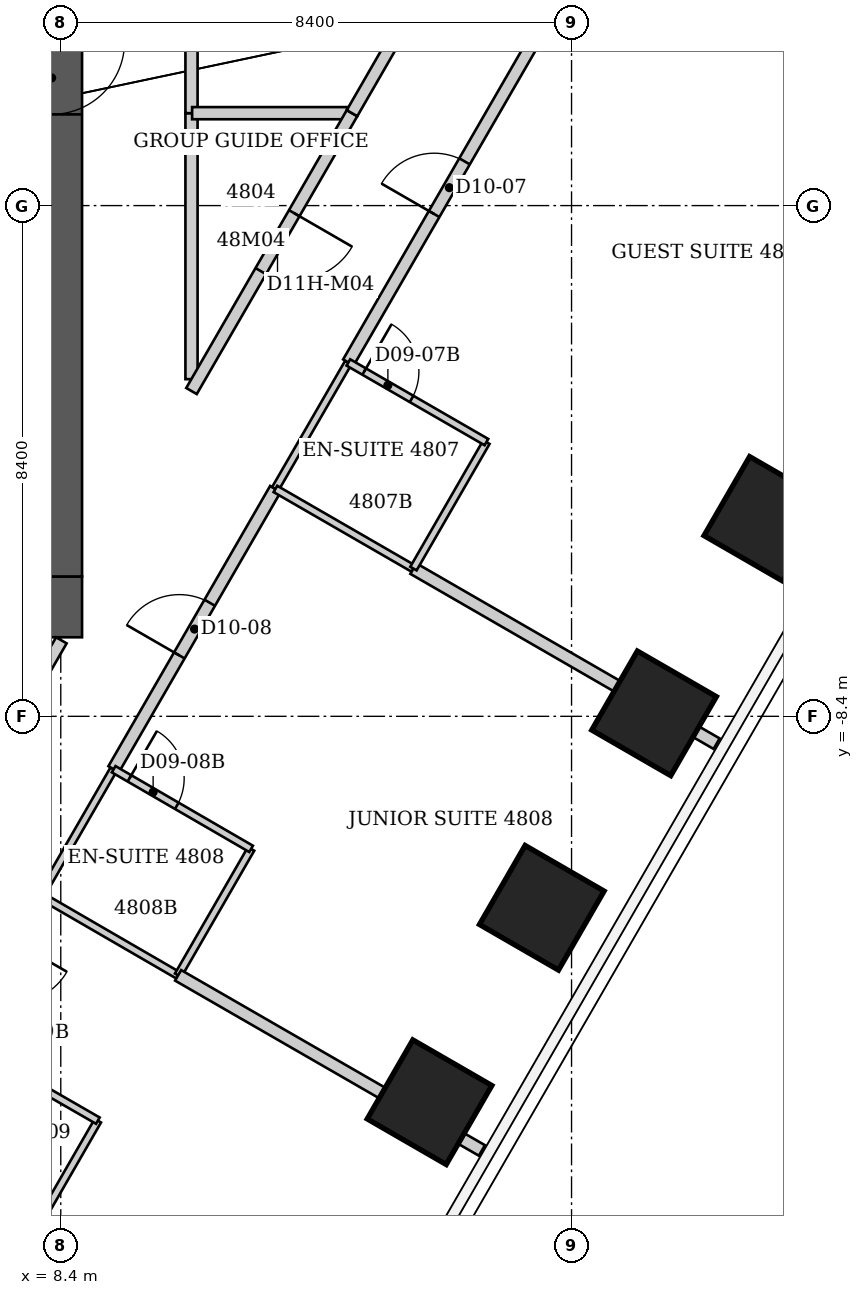
"""IFC4 building model, lengths in metres.
Left out: names, types, materials, properties, quantities, classifications, styles, units other than length and angle.
Written with IfcOpenShell. Run it as: python <this file> out.ifc"""

import sys

from ifc_helpers import new_model, si_unit, direction, frame, frame_2d, origin, origin_2d, place, context, subcontext, project, spatial, rectangle, extrude, element, fill, save


model = new_model("IFC4")
c1 = context("Model", 3, precision=1e-05, world=origin(), true_north=direction((0.0, 1.0)))
c2 = subcontext(c1, "Body", "Model", "MODEL_VIEW")
j1 = project(units=[si_unit("LENGTHUNIT", "METRE"), si_unit("PLANEANGLEUNIT", "RADIAN")], contexts=[c1])
p1 = place(None, origin())
s1 = spatial("IfcSite", under=j1, at=p1, CompositionType="ELEMENT")
p2 = place(p1, origin())
s2 = spatial("IfcBuilding", under=s1, at=p2, CompositionType="ELEMENT")
p3 = place(p2, frame((0.0, 0.0, 194.6)))
s3 = spatial("IfcBuildingStorey", under=s2, at=p3, CompositionType="ELEMENT", Elevation=194.6)
for number, where, z_axis, x_axis in (
    (1, (20.003, -5.153, 0.0), (0.0, 0.0, 1.0), (0.866, -0.5, 0.0)),
    (2, (18.157, -8.351, 0.0), (0.0, 0.0, 1.0), (0.866, -0.5, 0.0)),
    (3, (16.311, -11.549, 0.0), (0.0, 0.0, 1.0), (0.866, -0.5, 0.0)),
    (4, (14.465, -14.747, 0.0), (0.0, 0.0, 1.0), (0.866, -0.5, 0.0)),
):
    element("IfcColumn", number, at=place(p3, frame(where, z_axis=z_axis, x_axis=x_axis)), inside=s3, PredefinedType="COLUMN", context=c2, shape_type="SweptSolid", body=[
        extrude(rectangle(XDim=1.5, YDim=1.5, at=origin_2d()), origin(), (0.0, 0.0, 1.0), 3.8),
    ])
p4 = place(p3, frame((-8.75, -6.6, 0.0), z_axis=(0.0, 0.0, 1.0), x_axis=(1.0, 0.0, 0.0)))
e5 = element("IfcWall", 5, at=p4, inside=s3, PredefinedType="SHEAR", context=c2, shape_type="SweptSolid", body=[
    extrude(rectangle(XDim=17.5, YDim=1.0, at=frame_2d((8.75, 0.0))), origin(), (0.0, 0.0, 1.0), 3.8),
])
p5 = place(p3, frame((8.25, -6.1, 0.0), z_axis=(0.0, 0.0, 1.0), x_axis=(0.0, 1.0, 0.0)))
e6 = element("IfcWall", 6, at=p5, inside=s3, PredefinedType="SHEAR", context=c2, shape_type="SweptSolid", body=[
    extrude(rectangle(XDim=12.2, YDim=1.0, at=frame_2d((6.1, 0.0))), origin(), (0.0, 0.0, 1.0), 3.8),
])
p6 = place(p5, frame((7.6, 0.0, 0.0)))
e7 = element("IfcOpeningElement", 7, at=p6, cuts=e6, PredefinedType="OPENING", context=c2, shape_type="SweptSolid", body=[
    extrude(rectangle(XDim=1.2, YDim=2.2, at=frame_2d((0.6, 1.1))), frame((0.0, 0.5, 0.0), z_axis=(0.0, -1.0, 0.0), x_axis=(1.0, 0.0, 0.0)), (0.0, 0.0, 1.0), 1.0),
])
p7 = place(p3, frame((5.515, -15.932, 0.0), z_axis=(0.0, 0.0, 1.0), x_axis=(0.327594697431, -0.944818349851, 0.0)))
e8 = element("IfcWall", 8, at=p7, inside=s3, PredefinedType="PARTITIONING", context=c2, shape_type="SweptSolid", body=[
    extrude(rectangle(XDim=10.668, YDim=0.2, at=frame_2d((5.334, 0.0))), origin(), (0.0, 0.0, 1.0), 3.64),
])
p8 = place(p3, frame((7.76, -17.22, 0.0), z_axis=(0.0, 0.0, 1.0), x_axis=(0.499159685399, 0.866510016372, 0.0)))
e9 = element("IfcWall", 9, at=p8, inside=s3, PredefinedType="PARTITIONING", context=c2, shape_type="SweptSolid", body=[
    extrude(rectangle(XDim=2.504, YDim=0.12, at=frame_2d((1.252, 0.0))), origin(), (0.0, 0.0, 1.0), 3.64),
])
p9 = place(p3, frame((8.07, -11.35, 0.0), z_axis=(0.0, 0.0, 1.0), x_axis=(0.499693115345, 0.866202511239, 0.0)))
e10 = element("IfcWall", 10, at=p9, inside=s3, PredefinedType="PARTITIONING", context=c2, shape_type="SweptSolid", body=[
    extrude(rectangle(XDim=2.401, YDim=0.12, at=frame_2d((1.201, 0.0))), origin(), (0.0, 0.0, 1.0), 3.64),
])
p10 = place(p3, frame((8.07, -11.35, 0.0), z_axis=(0.0, 0.0, 1.0), x_axis=(0.865195830568, -0.501434118073, 0.0)))
e11 = element("IfcWall", 11, at=p10, inside=s3, PredefinedType="PARTITIONING", context=c2, shape_type="SweptSolid", body=[
    extrude(rectangle(XDim=2.612, YDim=0.12, at=frame_2d((1.306, 0.0))), origin(), (0.0, 0.0, 1.0), 3.64),
])
p11 = place(p3, frame((8.41, -7.15, 0.0), z_axis=(0.0, 0.0, 1.0), x_axis=(-0.499828628176, -0.866124322748, 0.0)))
e12 = element("IfcWall", 12, at=p11, inside=s3, PredefinedType="PARTITIONING", context=c2, shape_type="SweptSolid", body=[
    extrude(rectangle(XDim=10.484, YDim=0.2, at=frame_2d((5.242, 0.0))), origin(), (0.0, 0.0, 1.0), 3.64),
])
p12 = place(p11, frame((4.692, 0.0, 0.0)))
e13 = element("IfcOpeningElement", 13, at=p12, cuts=e12, PredefinedType="OPENING", context=c2, shape_type="SweptSolid", body=[
    extrude(rectangle(XDim=1.1, YDim=2.2, at=frame_2d((0.55, 1.1))), frame((0.0, 0.1, 0.0), z_axis=(0.0, -1.0, 0.0), x_axis=(1.0, 0.0, 0.0)), (0.0, 0.0, 1.0), 0.2),
])
p13 = place(p3, frame((9.01, -15.05, 0.0), z_axis=(0.0, 0.0, 1.0), x_axis=(-0.866615255992, 0.498976951453, 0.0)))
e14 = element("IfcWall", 14, at=p13, inside=s3, PredefinedType="PARTITIONING", context=c2, shape_type="SweptSolid", body=[
    extrude(rectangle(XDim=2.666, YDim=0.12, at=frame_2d((1.333, 0.0))), origin(), (0.0, 0.0, 1.0), 3.64),
])
p14 = place(p13, frame((1.466, 0.0, 0.0)))
e15 = element("IfcOpeningElement", 15, at=p14, cuts=e14, PredefinedType="OPENING", context=c2, shape_type="SweptSolid", body=[
    extrude(rectangle(XDim=0.9, YDim=2.03, at=frame_2d((0.45, 1.015))), frame((0.0, 0.06, 0.0), z_axis=(0.0, -1.0, 0.0), x_axis=(1.0, 0.0, 0.0)), (0.0, 0.0, 1.0), 0.12),
])
p15 = place(p3, frame((9.27, -9.27, 0.0), z_axis=(0.0, 0.0, 1.0), x_axis=(0.499755544815, 0.866166494057, 0.0)))
e16 = element("IfcWall", 16, at=p15, inside=s3, PredefinedType="PARTITIONING", context=c2, shape_type="SweptSolid", body=[
    extrude(rectangle(XDim=5.323, YDim=0.2, at=frame_2d((2.661, 0.0))), origin(), (0.0, 0.0, 1.0), 3.64),
])
p16 = place(p15, frame((2.161, 0.0, 0.0)))
e17 = element("IfcOpeningElement", 17, at=p16, cuts=e16, PredefinedType="OPENING", context=c2, shape_type="SweptSolid", body=[
    extrude(rectangle(XDim=1.0, YDim=2.13, at=frame_2d((0.5, 1.065))), frame((0.0, 0.1, 0.0), z_axis=(0.0, -1.0, 0.0), x_axis=(1.0, 0.0, 0.0)), (0.0, 0.0, 1.0), 0.2),
])
p17 = place(p3, frame((10.33, -12.66, 0.0), z_axis=(0.0, 0.0, 1.0), x_axis=(0.499737123639, 0.866177122335, 0.0)))
e18 = element("IfcWall", 18, at=p17, inside=s3, PredefinedType="PARTITIONING", context=c2, shape_type="SweptSolid", body=[
    extrude(rectangle(XDim=2.401, YDim=0.12, at=frame_2d((1.201, 0.0))), origin(), (0.0, 0.0, 1.0), 3.64),
])
p18 = place(p3, frame((10.33, -12.66, 0.0), z_axis=(0.0, 0.0, 1.0), x_axis=(0.866342721203, -0.499449986905, 0.0)))
e19 = element("IfcWall", 19, at=p18, inside=s3, PredefinedType="PARTITIONING", context=c2, shape_type="SweptSolid", body=[
    extrude(rectangle(XDim=5.767, YDim=0.2, at=frame_2d((2.883, 0.0))), origin(), (0.0, 0.0, 1.0), 3.64),
])
p19 = place(p3, frame((10.55, -2.855, 0.0), z_axis=(0.0, 0.0, 1.0), x_axis=(0.0, 1.0, 0.0)))
e20 = element("IfcWall", 20, at=p19, inside=s3, PredefinedType="PARTITIONING", context=c2, shape_type="SweptSolid", body=[
    extrude(rectangle(XDim=4.375, YDim=0.2, at=frame_2d((2.188, 0.0))), origin(), (0.0, 0.0, 1.0), 3.64),
])
p20 = place(p3, frame((10.55, 1.52, 0.0), z_axis=(0.0, 0.0, 1.0), x_axis=(0.0, 1.0, 0.0)))
e21 = element("IfcWall", 21, at=p20, inside=s3, PredefinedType="PARTITIONING", context=c2, shape_type="SweptSolid", body=[
    extrude(rectangle(XDim=4.57, YDim=0.2, at=frame_2d((2.285, 0.0))), origin(), (0.0, 0.0, 1.0), 3.64),
])
p21 = place(p20, frame((1.735, 0.0, 0.0)))
e22 = element("IfcOpeningElement", 22, at=p21, cuts=e21, PredefinedType="OPENING", context=c2, shape_type="SweptSolid", body=[
    extrude(rectangle(XDim=1.1, YDim=2.2, at=frame_2d((0.55, 1.1))), frame((0.0, 0.1, 0.0), z_axis=(0.0, -1.0, 0.0), x_axis=(1.0, 0.0, 0.0)), (0.0, 0.0, 1.0), 0.2),
])
p22 = place(p3, frame((10.56, 1.52, 0.0), z_axis=(0.0, 0.0, 1.0), x_axis=(1.0, 0.0, 0.0)))
e23 = element("IfcWall", 23, at=p22, inside=s3, PredefinedType="PARTITIONING", context=c2, shape_type="SweptSolid", body=[
    extrude(rectangle(XDim=2.55, YDim=0.2, at=frame_2d((1.275, 0.0))), origin(), (0.0, 0.0, 1.0), 3.64),
])
p23 = place(p3, frame((11.53, -10.58, 0.0), z_axis=(0.0, 0.0, 1.0), x_axis=(-0.865155281359, 0.50150407689, 0.0)))
e24 = element("IfcWall", 24, at=p23, inside=s3, PredefinedType="PARTITIONING", context=c2, shape_type="SweptSolid", body=[
    extrude(rectangle(XDim=2.612, YDim=0.12, at=frame_2d((1.306, 0.0))), origin(), (0.0, 0.0, 1.0), 3.64),
])
p24 = place(p23, frame((1.412, 0.0, 0.0)))
e25 = element("IfcOpeningElement", 25, at=p24, cuts=e24, PredefinedType="OPENING", context=c2, shape_type="SweptSolid", body=[
    extrude(rectangle(XDim=0.9, YDim=2.03, at=frame_2d((0.45, 1.015))), frame((0.0, 0.06, 0.0), z_axis=(0.0, -1.0, 0.0), x_axis=(1.0, 0.0, 0.0)), (0.0, 0.0, 1.0), 0.12),
])
p25 = place(p3, frame((11.928, -4.659, 0.0), z_axis=(0.0, 0.0, 1.0), x_axis=(0.500643444581, 0.865653592032, 0.0)))
e26 = element("IfcWall", 26, at=p25, inside=s3, PredefinedType="PARTITIONING", context=c2, shape_type="SweptSolid", body=[
    extrude(rectangle(XDim=2.401, YDim=0.12, at=frame_2d((1.201, 0.0))), origin(), (0.0, 0.0, 1.0), 3.64),
])
p26 = place(p3, frame((11.93, -4.66, 0.0), z_axis=(0.0, 0.0, 1.0), x_axis=(0.865969958829, -0.500096021185, 0.0)))
e27 = element("IfcWall", 27, at=p26, inside=s3, PredefinedType="PARTITIONING", context=c2, shape_type="SweptSolid", body=[
    extrude(rectangle(XDim=2.621, YDim=0.12, at=frame_2d((1.311, 0.0))), origin(), (0.0, 0.0, 1.0), 3.038),
])
p27 = place(p3, frame((13.13, -2.58, 0.0), z_axis=(0.0, 0.0, 1.0), x_axis=(0.500148944124, 0.865939393775, 0.0)))
e28 = element("IfcWall", 28, at=p27, inside=s3, PredefinedType="PARTITIONING", context=c2, shape_type="SweptSolid", body=[
    extrude(rectangle(XDim=6.64, YDim=0.2, at=frame_2d((3.32, 0.0))), origin(), (0.0, 0.0, 1.0), 3.64),
])
p28 = place(p27, frame((2.82, 0.0, 0.0)))
e29 = element("IfcOpeningElement", 29, at=p28, cuts=e28, PredefinedType="OPENING", context=c2, shape_type="SweptSolid", body=[
    extrude(rectangle(XDim=1.0, YDim=2.13, at=frame_2d((0.5, 1.065))), frame((0.0, 0.1, 0.0), z_axis=(0.0, -1.0, 0.0), x_axis=(1.0, 0.0, 0.0)), (0.0, 0.0, 1.0), 0.2),
])
p29 = place(p3, frame((13.19, 1.52, 0.0), z_axis=(0.0, 0.0, 1.0), x_axis=(-0.500193590286, -0.865913605527, 0.0)))
e30 = element("IfcWall", 30, at=p29, inside=s3, PredefinedType="PARTITIONING", context=c2, shape_type="SweptSolid", body=[
    extrude(rectangle(XDim=5.278, YDim=0.2, at=frame_2d((2.639, 0.0))), origin(), (0.0, 0.0, 1.0), 3.64),
])
p30 = place(p29, frame((1.9, 0.0, 0.0)))
e31 = element("IfcOpeningElement", 31, at=p30, cuts=e30, PredefinedType="OPENING", context=c2, shape_type="SweptSolid", body=[
    extrude(rectangle(XDim=1.1, YDim=2.2, at=frame_2d((0.55, 1.1))), frame((0.0, 0.1, 0.0), z_axis=(0.0, -1.0, 0.0), x_axis=(1.0, 0.0, 0.0)), (0.0, 0.0, 1.0), 0.2),
])
p31 = place(p3, frame((14.2, -5.971, 0.0), z_axis=(0.0, 0.0, 1.0), x_axis=(0.86600340545, -0.500038100297, 0.0)))
e32 = element("IfcWall", 32, at=p31, inside=s3, PredefinedType="PARTITIONING", context=c2, shape_type="SweptSolid", body=[
    extrude(rectangle(XDim=5.758, YDim=0.2, at=frame_2d((2.879, 0.0))), origin(), (0.0, 0.0, 1.0), 3.038),
])
p32 = place(p3, frame((14.2, -5.97, 0.0), z_axis=(0.0, 0.0, 1.0), x_axis=(0.499737123639, 0.866177122335, 0.0)))
e33 = element("IfcWall", 33, at=p32, inside=s3, PredefinedType="PARTITIONING", context=c2, shape_type="SweptSolid", body=[
    extrude(rectangle(XDim=2.401, YDim=0.12, at=frame_2d((1.201, 0.0))), origin(), (0.0, 0.0, 1.0), 3.64),
])
p33 = place(p3, frame((15.4, -3.89, 0.0), z_axis=(0.0, 0.0, 1.0), x_axis=(-0.866154567199, 0.49977621564, 0.0)))
e34 = element("IfcWall", 34, at=p33, inside=s3, PredefinedType="PARTITIONING", context=c2, shape_type="SweptSolid", body=[
    extrude(rectangle(XDim=2.621, YDim=0.12, at=frame_2d((1.311, 0.0))), origin(), (0.0, 0.0, 1.0), 3.64),
])
p34 = place(p33, frame((1.421, 0.0, 0.0)))
e35 = element("IfcOpeningElement", 35, at=p34, cuts=e34, PredefinedType="OPENING", context=c2, shape_type="SweptSolid", body=[
    extrude(rectangle(XDim=0.9, YDim=2.03, at=frame_2d((0.45, 1.015))), frame((0.0, 0.06, 0.0), z_axis=(0.0, -1.0, 0.0), x_axis=(1.0, 0.0, 0.0)), (0.0, 0.0, 1.0), 0.12),
])
p35 = place(p3, frame((15.41, 5.37, 0.0), z_axis=(0.0, 0.0, 1.0), x_axis=(-0.499513190454, -0.866306281036, 0.0)))
e36 = element("IfcWall", 36, at=p35, inside=s3, PredefinedType="PARTITIONING", context=c2, shape_type="SweptSolid", body=[
    extrude(rectangle(XDim=4.444, YDim=0.2, at=frame_2d((2.222, 0.0))), origin(), (0.0, 0.0, 1.0), 3.64),
])
p36 = place(p28, origin())
e37 = element("IfcDoor", 37, at=p36, inside=s3, OperationType="SINGLE_SWING_LEFT", PredefinedType="DOOR", context=c2, shape_type="SweptSolid", body=[
    extrude(rectangle(XDim=1.0, YDim=2.13, at=frame_2d((0.5, 1.065))), frame((0.0, 0.025, 0.0), z_axis=(0.0, -1.0, 0.0), x_axis=(1.0, 0.0, 0.0)), (0.0, 0.0, 1.0), 0.05),
])
fill(e29, e37)
p37 = place(p34, origin())
e38 = element("IfcDoor", 38, at=p37, inside=s3, OperationType="SINGLE_SWING_RIGHT", PredefinedType="DOOR", context=c2, shape_type="SweptSolid", body=[
    extrude(rectangle(XDim=0.9, YDim=2.03, at=frame_2d((0.45, 1.015))), frame((0.0, 0.025, 0.0), z_axis=(0.0, -1.0, 0.0), x_axis=(1.0, 0.0, 0.0)), (0.0, 0.0, 1.0), 0.05),
])
fill(e35, e38)
p38 = place(p16, origin())
e39 = element("IfcDoor", 39, at=p38, inside=s3, OperationType="SINGLE_SWING_LEFT", PredefinedType="DOOR", context=c2, shape_type="SweptSolid", body=[
    extrude(rectangle(XDim=1.0, YDim=2.13, at=frame_2d((0.5, 1.065))), frame((0.0, 0.025, 0.0), z_axis=(0.0, -1.0, 0.0), x_axis=(1.0, 0.0, 0.0)), (0.0, 0.0, 1.0), 0.05),
])
fill(e17, e39)
p39 = place(p24, origin())
e40 = element("IfcDoor", 40, at=p39, inside=s3, OperationType="SINGLE_SWING_RIGHT", PredefinedType="DOOR", context=c2, shape_type="SweptSolid", body=[
    extrude(rectangle(XDim=0.9, YDim=2.03, at=frame_2d((0.45, 1.015))), frame((0.0, 0.025, 0.0), z_axis=(0.0, -1.0, 0.0), x_axis=(1.0, 0.0, 0.0)), (0.0, 0.0, 1.0), 0.05),
])
fill(e25, e40)
p40 = place(p30, origin())
e41 = element("IfcDoor", 41, at=p40, inside=s3, OperationType="SINGLE_SWING_LEFT", PredefinedType="DOOR", context=c2, shape_type="SweptSolid", body=[
    extrude(rectangle(XDim=1.1, YDim=2.2, at=frame_2d((0.55, 1.1))), frame((0.0, 0.025, 0.0), z_axis=(0.0, -1.0, 0.0), x_axis=(1.0, 0.0, 0.0)), (0.0, 0.0, 1.0), 0.05),
])
fill(e31, e41)
p41 = place(p6, origin())
e42 = element("IfcDoor", 42, at=p41, inside=s3, OperationType="SINGLE_SWING_RIGHT", PredefinedType="DOOR", context=c2, shape_type="SweptSolid", body=[
    extrude(rectangle(XDim=1.2, YDim=2.2, at=frame_2d((0.6, 1.1))), frame((0.0, 0.025, 0.0), z_axis=(0.0, -1.0, 0.0), x_axis=(1.0, 0.0, 0.0)), (0.0, 0.0, 1.0), 0.05),
])
fill(e7, e42)
save(model, sys.argv[1])
